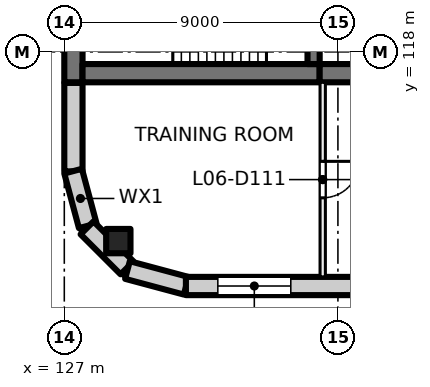
"""IFC4 building model, lengths in metres.
Left out: names, types, materials, properties, quantities, classifications, styles, units other than length and angle.
Written with IfcOpenShell. Run it as: python <this file> out.ifc"""

import sys

from ifc_helpers import new_model, si_unit, direction, frame, frame_2d, origin, origin_2d, place, context, subcontext, project, spatial, rectangle, extrude, element, fill, save


model = new_model("IFC4")
c1 = context("Model", 3, precision=1e-05, world=origin(), true_north=direction((0.0, 1.0)))
c2 = subcontext(c1, "Body", "Model", "MODEL_VIEW")
j1 = project(units=[si_unit("LENGTHUNIT", "METRE"), si_unit("PLANEANGLEUNIT", "RADIAN")], contexts=[c1])
p1 = place(None, origin())
s1 = spatial("IfcSite", under=j1, at=p1, CompositionType="ELEMENT")
p2 = place(p1, origin())
s2 = spatial("IfcBuilding", under=s1, at=p2, CompositionType="ELEMENT")
p3 = place(p2, frame((0.0, 0.0, 31.5)))
s3 = spatial("IfcBuildingStorey", under=s2, at=p3, CompositionType="ELEMENT", Elevation=31.5)
p4 = place(p3, frame((128.777, 111.777, 0.0), z_axis=(0.0, 0.0, 1.0), x_axis=(1.0, 0.0, 0.0)))
e1 = element("IfcColumn", 1, at=p4, inside=s3, PredefinedType="COLUMN", context=c2, shape_type="SweptSolid", body=[
    extrude(rectangle(XDim=0.8, YDim=0.8, at=origin_2d()), origin(), (0.0, 0.0, 1.0), 4.0),
])
p5 = place(p3, frame((127.3, 117.0, 0.0), z_axis=(0.0, 0.0, 1.0), x_axis=(0.0, 1.0, 0.0)))
e2 = element("IfcWall", 2, at=p5, inside=s3, PredefinedType="SHEAR", context=c2, shape_type="SweptSolid", body=[
    extrude(rectangle(XDim=3.8, YDim=0.6, at=frame_2d((1.9, 0.0))), origin(), (0.0, 0.0, 1.0), 4.0),
])
p6 = place(p3, frame((127.6, 117.3, 0.0), z_axis=(0.0, 0.0, 1.0), x_axis=(1.0, 0.0, 0.0)))
e3 = element("IfcWall", 3, at=p6, inside=s3, PredefinedType="SHEAR", context=c2, shape_type="SweptSolid", body=[
    extrude(rectangle(XDim=7.8, YDim=0.6, at=frame_2d((3.9, 0.0))), origin(), (0.0, 0.0, 1.0), 4.0),
])
p7 = place(p3, frame((135.4, 117.3, 0.0), z_axis=(0.0, 0.0, 1.0), x_axis=(1.0, 0.0, 0.0)))
e4 = element("IfcWall", 4, at=p7, inside=s3, PredefinedType="SHEAR", context=c2, shape_type="SweptSolid", body=[
    extrude(rectangle(XDim=4.6, YDim=0.6, at=frame_2d((2.3, 0.0))), origin(), (0.0, 0.0, 1.0), 4.0),
])
p8 = place(p3, frame((135.2, 117.6, 0.0), z_axis=(0.0, 0.0, 1.0), x_axis=(0.0, 1.0, 0.0)))
e5 = element("IfcWall", 5, at=p8, inside=s3, PredefinedType="SHEAR", context=c2, shape_type="SweptSolid", body=[
    extrude(rectangle(XDim=2.8, YDim=0.4, at=frame_2d((1.4, 0.0))), origin(), (0.0, 0.0, 1.0), 4.0),
])
p9 = place(p8, frame((0.9, 0.0, 0.0)))
e6 = element("IfcOpeningElement", 6, at=p9, cuts=e5, PredefinedType="OPENING", context=c2, shape_type="SweptSolid", body=[
    extrude(rectangle(XDim=1.0, YDim=2.1, at=frame_2d((0.5, 1.05))), frame((0.0, 0.21, 0.0), z_axis=(0.0, -1.0, 0.0), x_axis=(1.0, 0.0, 0.0)), (0.0, 0.0, 1.0), 0.42),
])
p10 = place(p3, frame((127.3, 114.07, 0.0), z_axis=(0.0, 0.0, 1.0), x_axis=(0.0, 1.0, 0.0)))
e7 = element("IfcWall", 7, at=p10, inside=s3, PredefinedType="SOLIDWALL", context=c2, shape_type="SweptSolid", body=[
    extrude(rectangle(XDim=2.91, YDim=0.6, at=frame_2d((1.455, 0.0))), origin(), (0.0, 0.0, 1.0), 3.625),
])
for number, where, z_axis, x_axis in (
    (8, (127.771, 112.281, 0.0), (0.0, 0.0, 1.0), (-0.259, 0.966, 0.0)),
    (9, (129.064, 110.896, 0.0), (0.0, 0.0, 1.0), (-0.707, 0.707, 0.0)),
):
    element("IfcWall", number, at=place(p3, frame(where, z_axis=z_axis, x_axis=x_axis)), inside=s3, PredefinedType="SOLIDWALL", context=c2, shape_type="SweptSolid", body=[
        extrude(rectangle(XDim=1.861, YDim=0.6, at=frame_2d((0.93, 0.0))), origin(), (0.0, 0.0, 1.0), 3.625),
    ])
p11 = place(p3, frame((131.01, 110.308, 0.0), z_axis=(0.0, 0.0, 1.0), x_axis=(-0.965920269068, 0.258839784042, 0.0)))
e10 = element("IfcWall", 10, at=p11, inside=s3, PredefinedType="SOLIDWALL", context=c2, shape_type="SweptSolid", body=[
    extrude(rectangle(XDim=2.0, YDim=0.6, at=frame_2d((1.0, 0.0))), origin(), (0.0, 0.0, 1.0), 3.625),
])
p12 = place(p3, frame((162.93, 110.3, 0.0), z_axis=(0.0, 0.0, 1.0), x_axis=(-1.0, 0.0, 0.0)))
e11 = element("IfcWall", 11, at=p12, inside=s3, PredefinedType="SOLIDWALL", context=c2, shape_type="SweptSolid", body=[
    extrude(rectangle(XDim=31.93, YDim=0.6, at=frame_2d((15.965, 0.0))), origin(), (0.0, 0.0, 1.0), 3.625),
])
p13 = place(p12, frame((1.48, 0.0, 0.9)))
e12 = element("IfcOpeningElement", 12, at=p13, cuts=e11, PredefinedType="OPENING", context=c2, shape_type="SweptSolid", body=[
    extrude(rectangle(XDim=2.4, YDim=2.4, at=frame_2d((1.2, 1.2))), frame((0.0, 0.31, 0.0), z_axis=(0.0, -1.0, 0.0), x_axis=(1.0, 0.0, 0.0)), (0.0, 0.0, 1.0), 0.62),
])
p14 = place(p12, frame((5.98, 0.0, 0.9)))
e13 = element("IfcOpeningElement", 13, at=p14, cuts=e11, PredefinedType="OPENING", context=c2, shape_type="SweptSolid", body=[
    extrude(rectangle(XDim=2.4, YDim=2.4, at=frame_2d((1.2, 1.2))), frame((0.0, 0.31, 0.0), z_axis=(0.0, -1.0, 0.0), x_axis=(1.0, 0.0, 0.0)), (0.0, 0.0, 1.0), 0.62),
])
p15 = place(p12, frame((10.48, 0.0, 0.9)))
e14 = element("IfcOpeningElement", 14, at=p15, cuts=e11, PredefinedType="OPENING", context=c2, shape_type="SweptSolid", body=[
    extrude(rectangle(XDim=2.4, YDim=2.4, at=frame_2d((1.2, 1.2))), frame((0.0, 0.31, 0.0), z_axis=(0.0, -1.0, 0.0), x_axis=(1.0, 0.0, 0.0)), (0.0, 0.0, 1.0), 0.62),
])
p16 = place(p12, frame((14.98, 0.0, 0.9)))
e15 = element("IfcOpeningElement", 15, at=p16, cuts=e11, PredefinedType="OPENING", context=c2, shape_type="SweptSolid", body=[
    extrude(rectangle(XDim=2.4, YDim=2.4, at=frame_2d((1.2, 1.2))), frame((0.0, 0.31, 0.0), z_axis=(0.0, -1.0, 0.0), x_axis=(1.0, 0.0, 0.0)), (0.0, 0.0, 1.0), 0.62),
])
p17 = place(p12, frame((19.48, 0.0, 0.9)))
e16 = element("IfcOpeningElement", 16, at=p17, cuts=e11, PredefinedType="OPENING", context=c2, shape_type="SweptSolid", body=[
    extrude(rectangle(XDim=2.4, YDim=2.4, at=frame_2d((1.2, 1.2))), frame((0.0, 0.31, 0.0), z_axis=(0.0, -1.0, 0.0), x_axis=(1.0, 0.0, 0.0)), (0.0, 0.0, 1.0), 0.62),
])
p18 = place(p12, frame((23.98, 0.0, 0.9)))
e17 = element("IfcOpeningElement", 17, at=p18, cuts=e11, PredefinedType="OPENING", context=c2, shape_type="SweptSolid", body=[
    extrude(rectangle(XDim=2.4, YDim=2.4, at=frame_2d((1.2, 1.2))), frame((0.0, 0.31, 0.0), z_axis=(0.0, -1.0, 0.0), x_axis=(1.0, 0.0, 0.0)), (0.0, 0.0, 1.0), 0.62),
])
p19 = place(p12, frame((28.48, 0.0, 0.9)))
e18 = element("IfcOpeningElement", 18, at=p19, cuts=e11, PredefinedType="OPENING", context=c2, shape_type="SweptSolid", body=[
    extrude(rectangle(XDim=2.4, YDim=2.4, at=frame_2d((1.2, 1.2))), frame((0.0, 0.31, 0.0), z_axis=(0.0, -1.0, 0.0), x_axis=(1.0, 0.0, 0.0)), (0.0, 0.0, 1.0), 0.62),
])
p20 = place(p3, frame((135.5, 117.0, 0.0), z_axis=(0.0, 0.0, 1.0), x_axis=(0.0, -1.0, 0.0)))
e19 = element("IfcWall", 19, at=p20, inside=s3, PredefinedType="PARTITIONING", context=c2, shape_type="SweptSolid", body=[
    extrude(rectangle(XDim=6.4, YDim=0.175, at=frame_2d((3.2, 0.0))), origin(), (0.0, 0.0, 1.0), 3.625),
])
p21 = place(p20, frame((2.6, 0.0, 0.0)))
e20 = element("IfcOpeningElement", 20, at=p21, cuts=e19, PredefinedType="OPENING", context=c2, shape_type="SweptSolid", body=[
    extrude(rectangle(XDim=1.2, YDim=2.1, at=frame_2d((0.6, 1.05))), frame((0.0, 0.097, 0.0), z_axis=(0.0, -1.0, 0.0), x_axis=(1.0, 0.0, 0.0)), (0.0, 0.0, 1.0), 0.195),
])
p22 = place(p19, origin())
e21 = element("IfcWindow", 21, at=p22, inside=s3, PartitioningType="SINGLE_PANEL", PredefinedType="WINDOW", context=c2, shape_type="SweptSolid", body=[
    extrude(rectangle(XDim=2.4, YDim=2.4, at=frame_2d((1.2, 1.2))), frame((0.0, 0.03, 0.0), z_axis=(0.0, -1.0, 0.0), x_axis=(1.0, 0.0, 0.0)), (0.0, 0.0, 1.0), 0.06),
])
fill(e18, e21)
p23 = place(p21, origin())
e22 = element("IfcDoor", 22, at=p23, inside=s3, OperationType="DOUBLE_DOOR_SINGLE_SWING", PredefinedType="DOOR", context=c2, shape_type="SweptSolid", body=[
    extrude(rectangle(XDim=1.2, YDim=2.1, at=frame_2d((0.6, 1.05))), frame((0.0, 0.025, 0.0), z_axis=(0.0, -1.0, 0.0), x_axis=(1.0, 0.0, 0.0)), (0.0, 0.0, 1.0), 0.05),
])
fill(e20, e22)
save(model, sys.argv[1])
